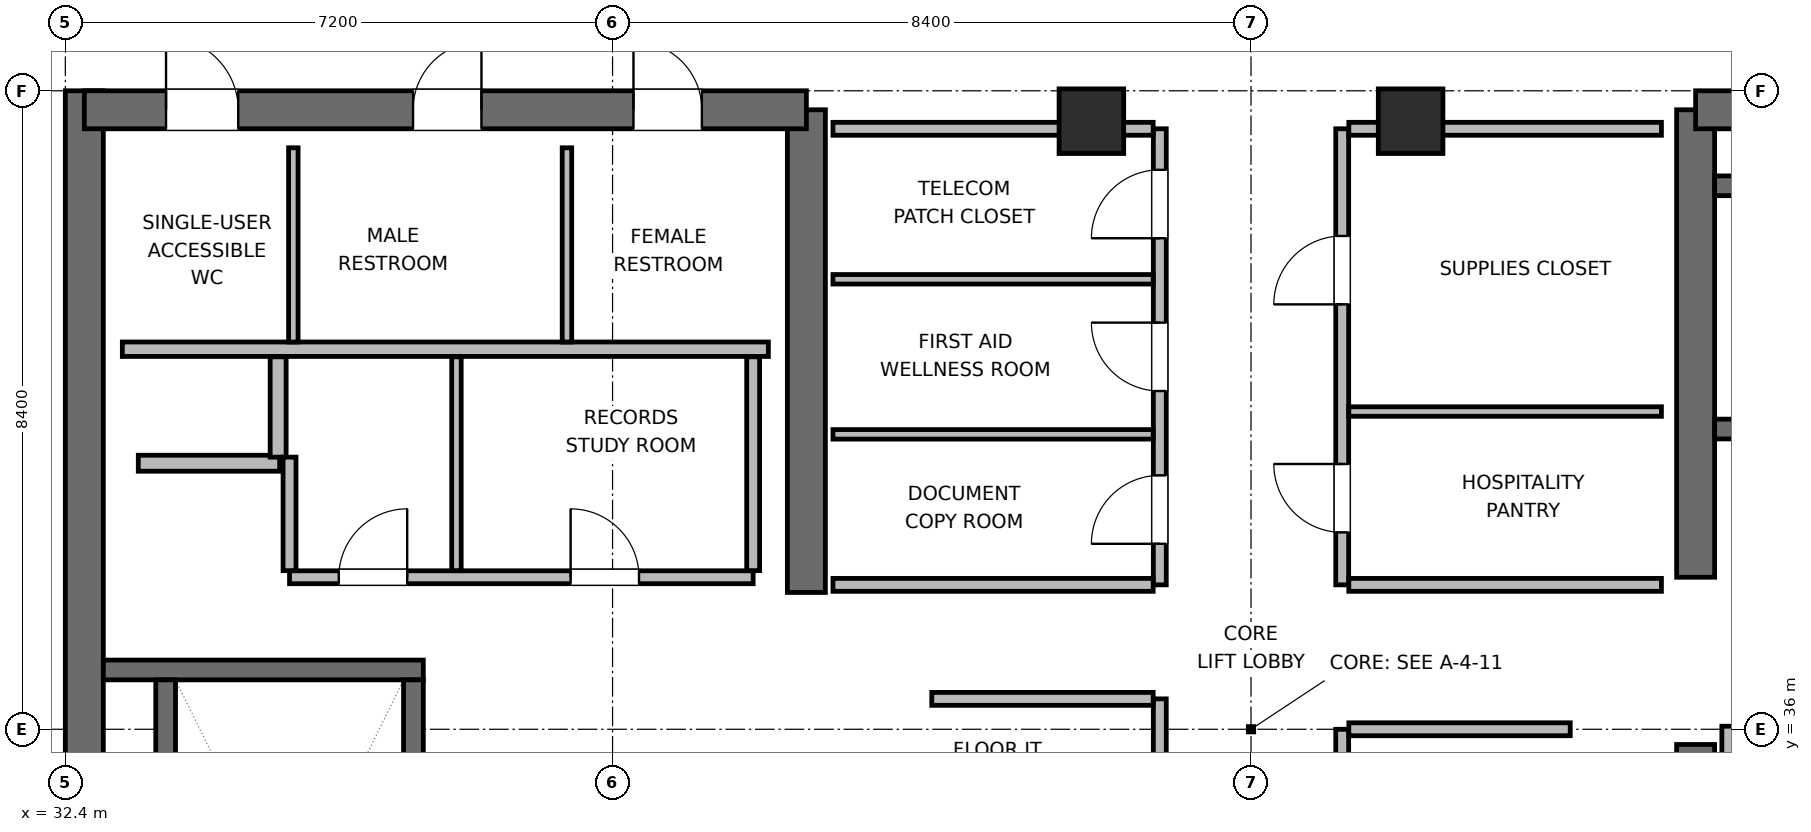
"""IFC4 building model, lengths in metres.
Left out: names, types, materials, properties, quantities, classifications, styles, units other than length and angle.
Written with IfcOpenShell. Run it as: python <this file> out.ifc"""

import sys

from ifc_helpers import new_model, si_unit, direction, frame, frame_2d, origin, origin_2d, place, context, subcontext, project, spatial, rectangle, extrude, element, fill, save


model = new_model("IFC4")
c1 = context("Model", 3, precision=1e-05, world=origin(), true_north=direction((0.0, 1.0)))
c2 = subcontext(c1, "Body", "Model", "MODEL_VIEW")
j1 = project(units=[si_unit("LENGTHUNIT", "METRE"), si_unit("PLANEANGLEUNIT", "RADIAN")], contexts=[c1])
p1 = place(None, origin())
s1 = spatial("IfcSite", under=j1, at=p1, CompositionType="ELEMENT")
p2 = place(p1, origin())
s2 = spatial("IfcBuilding", under=s1, at=p2, CompositionType="ELEMENT")
p3 = place(p2, frame((0.0, 0.0, 274.5)))
s3 = spatial("IfcBuildingStorey", under=s2, at=p3, CompositionType="ELEMENT", Elevation=274.5)
p4 = place(p3, frame((32.65, 27.6, 0.0), z_axis=(0.0, 0.0, 1.0), x_axis=(0.0, 1.0, 0.0)))
e1 = element("IfcWall", 1, at=p4, inside=s3, PredefinedType="SHEAR", context=c2, shape_type="SweptSolid", body=[
    extrude(rectangle(XDim=16.8, YDim=0.5, at=frame_2d((8.4, 0.0))), origin(), (0.0, 0.0, 1.0), 3.9),
])
p5 = place(p3, frame((42.15, 37.8, 0.0), z_axis=(0.0, 0.0, 1.0), x_axis=(0.0, 1.0, 0.0)))
e2 = element("IfcWall", 2, at=p5, inside=s3, PredefinedType="SHEAR", context=c2, shape_type="SweptSolid", body=[
    extrude(rectangle(XDim=6.35, YDim=0.5, at=frame_2d((3.175, 0.0))), origin(), (0.0, 0.0, 1.0), 3.9),
])
p6 = place(p3, frame((32.65, 44.15, 0.0), z_axis=(0.0, 0.0, 1.0), x_axis=(1.0, 0.0, 0.0)))
e3 = element("IfcWall", 3, at=p6, inside=s3, PredefinedType="SHEAR", context=c2, shape_type="SweptSolid", body=[
    extrude(rectangle(XDim=9.5, YDim=0.5, at=frame_2d((4.75, 0.0))), origin(), (0.0, 0.0, 1.0), 3.9),
])
p7 = place(p6, frame((1.075, 0.0, 0.0)))
e4 = element("IfcOpeningElement", 4, at=p7, cuts=e3, PredefinedType="OPENING", context=c2, shape_type="SweptSolid", body=[
    extrude(rectangle(XDim=0.95, YDim=2.04, at=frame_2d((0.475, 1.02))), frame((0.0, 0.26, 0.0), z_axis=(0.0, -1.0, 0.0), x_axis=(1.0, 0.0, 0.0)), (0.0, 0.0, 1.0), 0.52),
])
p8 = place(p6, frame((4.325, 0.0, 0.0)))
e5 = element("IfcOpeningElement", 5, at=p8, cuts=e3, PredefinedType="OPENING", context=c2, shape_type="SweptSolid", body=[
    extrude(rectangle(XDim=0.9, YDim=2.02, at=frame_2d((0.45, 1.01))), frame((0.0, 0.26, 0.0), z_axis=(0.0, -1.0, 0.0), x_axis=(1.0, 0.0, 0.0)), (0.0, 0.0, 1.0), 0.52),
])
p9 = place(p6, frame((7.225, 0.0, 0.0)))
e6 = element("IfcOpeningElement", 6, at=p9, cuts=e3, PredefinedType="OPENING", context=c2, shape_type="SweptSolid", body=[
    extrude(rectangle(XDim=0.9, YDim=2.02, at=frame_2d((0.45, 1.01))), frame((0.0, 0.26, 0.0), z_axis=(0.0, -1.0, 0.0), x_axis=(1.0, 0.0, 0.0)), (0.0, 0.0, 1.0), 0.52),
])
p10 = place(p3, frame((53.85, 27.85, 0.0), z_axis=(0.0, 0.0, 1.0), x_axis=(0.0, 1.0, 0.0)))
e7 = element("IfcWall", 7, at=p10, inside=s3, PredefinedType="SHEAR", context=c2, shape_type="SweptSolid", body=[
    extrude(rectangle(XDim=7.95, YDim=0.5, at=frame_2d((3.975, 0.0))), origin(), (0.0, 0.0, 1.0), 3.9),
])
p11 = place(p3, frame((53.85, 38.0, 0.0), z_axis=(0.0, 0.0, 1.0), x_axis=(0.0, 1.0, 0.0)))
e8 = element("IfcWall", 8, at=p11, inside=s3, PredefinedType="SHEAR", context=c2, shape_type="SweptSolid", body=[
    extrude(rectangle(XDim=6.15, YDim=0.5, at=frame_2d((3.075, 0.0))), origin(), (0.0, 0.0, 1.0), 3.9),
])
p12 = place(p3, frame((53.85, 44.15, 0.0), z_axis=(0.0, 0.0, 1.0), x_axis=(1.0, 0.0, 0.0)))
e9 = element("IfcWall", 9, at=p12, inside=s3, PredefinedType="SHEAR", context=c2, shape_type="SweptSolid", body=[
    extrude(rectangle(XDim=9.5, YDim=0.5, at=frame_2d((4.75, 0.0))), origin(), (0.0, 0.0, 1.0), 3.9),
])
p13 = place(p3, frame((32.9, 36.78, 0.0), z_axis=(0.0, 0.0, 1.0), x_axis=(1.0, 0.0, 0.0)))
e10 = element("IfcWall", 10, at=p13, inside=s3, PredefinedType="SHEAR", context=c2, shape_type="SweptSolid", body=[
    extrude(rectangle(XDim=4.21, YDim=0.26, at=frame_2d((2.105, 0.0))), origin(), (0.0, 0.0, 1.0), 3.9),
])
p14 = place(p3, frame((33.72, 29.05, 0.0), z_axis=(0.0, 0.0, 1.0), x_axis=(0.0, 1.0, 0.0)))
e11 = element("IfcWall", 11, at=p14, inside=s3, PredefinedType="SHEAR", context=c2, shape_type="SweptSolid", body=[
    extrude(rectangle(XDim=7.6, YDim=0.26, at=frame_2d((3.8, 0.0))), origin(), (0.0, 0.0, 1.0), 3.9),
])
p15 = place(p3, frame((36.98, 29.05, 0.0), z_axis=(0.0, 0.0, 1.0), x_axis=(0.0, 1.0, 0.0)))
e12 = element("IfcWall", 12, at=p15, inside=s3, PredefinedType="SHEAR", context=c2, shape_type="SweptSolid", body=[
    extrude(rectangle(XDim=7.6, YDim=0.26, at=frame_2d((3.8, 0.0))), origin(), (0.0, 0.0, 1.0), 3.9),
])
p16 = place(p15, frame((0.3, 0.0, 0.0)))
e13 = element("IfcOpeningElement", 13, at=p16, cuts=e12, PredefinedType="OPENING", context=c2, shape_type="SweptSolid", body=[
    extrude(rectangle(XDim=1.0, YDim=2.04, at=frame_2d((0.5, 1.02))), frame((0.0, 0.14, 0.0), z_axis=(0.0, -1.0, 0.0), x_axis=(1.0, 0.0, 0.0)), (0.0, 0.0, 1.0), 0.28),
])
p17 = place(p3, frame((54.1, 39.95, 0.0), z_axis=(0.0, 0.0, 1.0), x_axis=(1.0, 0.0, 0.0)))
e14 = element("IfcWall", 14, at=p17, inside=s3, PredefinedType="SHEAR", context=c2, shape_type="SweptSolid", body=[
    extrude(rectangle(XDim=9.0, YDim=0.26, at=frame_2d((4.5, 0.0))), origin(), (0.0, 0.0, 1.0), 3.9),
])
p18 = place(p17, frame((1.1, 0.0, 0.0)))
e15 = element("IfcOpeningElement", 15, at=p18, cuts=e14, PredefinedType="OPENING", context=c2, shape_type="SweptSolid", body=[
    extrude(rectangle(XDim=1.0, YDim=2.04, at=frame_2d((0.5, 1.02))), frame((0.0, 0.14, 0.0), z_axis=(0.0, -1.0, 0.0), x_axis=(1.0, 0.0, 0.0)), (0.0, 0.0, 1.0), 0.28),
])
p19 = place(p3, frame((54.1, 43.15, 0.0), z_axis=(0.0, 0.0, 1.0), x_axis=(1.0, 0.0, 0.0)))
e16 = element("IfcWall", 16, at=p19, inside=s3, PredefinedType="SHEAR", context=c2, shape_type="SweptSolid", body=[
    extrude(rectangle(XDim=9.0, YDim=0.26, at=frame_2d((4.5, 0.0))), origin(), (0.0, 0.0, 1.0), 3.9),
])
for number, where, z_axis, x_axis in (
    (17, (45.9, 44.0, 0.0), (0.0, 0.0, 1.0), (1.0, 0.0, 0.0)),
    (18, (50.1, 44.0, 0.0), (0.0, 0.0, 1.0), (1.0, 0.0, 0.0)),
):
    element("IfcColumn", number, at=place(p3, frame(where, z_axis=z_axis, x_axis=x_axis)), inside=s3, PredefinedType="COLUMN", context=c2, shape_type="SweptSolid", body=[
        extrude(rectangle(XDim=0.85, YDim=0.85, at=origin_2d()), origin(), (0.0, 0.0, 1.0), 3.9),
    ])
p20 = place(p3, frame((33.15, 41.0, 0.0), z_axis=(0.0, 0.0, 1.0), x_axis=(1.0, 0.0, 0.0)))
e19 = element("IfcWall", 19, at=p20, inside=s3, PredefinedType="PLUMBINGWALL", context=c2, shape_type="SweptSolid", body=[
    extrude(rectangle(XDim=8.5, YDim=0.19, at=frame_2d((4.25, 0.0))), origin(), (0.0, 0.0, 1.0), 3.68),
])
for number, where, z_axis, x_axis in (
    (20, (35.4, 41.095, 0.0), (0.0, 0.0, 1.0), (0.0, 1.0, 0.0)),
    (21, (39.0, 41.095, 0.0), (0.0, 0.0, 1.0), (0.0, 1.0, 0.0)),
):
    element("IfcWall", number, at=place(p3, frame(where, z_axis=z_axis, x_axis=x_axis)), inside=s3, PredefinedType="PARTITIONING", context=c2, shape_type="SweptSolid", body=[
        extrude(rectangle(XDim=2.555, YDim=0.125, at=frame_2d((1.277, 0.0))), origin(), (0.0, 0.0, 1.0), 3.68),
    ])
p21 = place(p3, frame((33.36, 39.5, 0.0), z_axis=(0.0, 0.0, 1.0), x_axis=(1.0, 0.0, 0.0)))
e22 = element("IfcWall", 22, at=p21, inside=s3, PredefinedType="PARTITIONING", context=c2, shape_type="SweptSolid", body=[
    extrude(rectangle(XDim=1.86, YDim=0.21, at=frame_2d((0.93, 0.0))), origin(), (0.0, 0.0, 1.0), 3.68),
])
p22 = place(p3, frame((35.2, 39.58, 0.0), z_axis=(0.0, 0.0, 1.0), x_axis=(0.0, 1.0, 0.0)))
e23 = element("IfcWall", 23, at=p22, inside=s3, PredefinedType="PARTITIONING", context=c2, shape_type="SweptSolid", body=[
    extrude(rectangle(XDim=1.32, YDim=0.21, at=frame_2d((0.66, 0.0))), origin(), (0.0, 0.0, 1.0), 3.68),
])
p23 = place(p3, frame((54.3, 34.26, 0.0), z_axis=(0.0, 0.0, 1.0), x_axis=(0.0, 1.0, 0.0)))
e24 = element("IfcWall", 24, at=p23, inside=s3, PredefinedType="PARTITIONING", context=c2, shape_type="SweptSolid", body=[
    extrude(rectangle(XDim=1.78, YDim=0.21, at=frame_2d((0.89, 0.0))), origin(), (0.0, 0.0, 1.0), 3.68),
])
p24 = place(p3, frame((35.35, 38.0, 0.0), z_axis=(0.0, 0.0, 1.0), x_axis=(1.0, 0.0, 0.0)))
e25 = element("IfcWall", 25, at=p24, inside=s3, PredefinedType="PARTITIONING", context=c2, shape_type="SweptSolid", body=[
    extrude(rectangle(XDim=6.1, YDim=0.17, at=frame_2d((3.05, 0.0))), origin(), (0.0, 0.0, 1.0), 3.68),
])
p25 = place(p24, frame((0.648, 0.0, 0.0)))
e26 = element("IfcOpeningElement", 26, at=p25, cuts=e25, PredefinedType="OPENING", context=c2, shape_type="SweptSolid", body=[
    extrude(rectangle(XDim=0.9, YDim=2.02, at=frame_2d((0.45, 1.01))), frame((0.0, 0.095, 0.0), z_axis=(0.0, -1.0, 0.0), x_axis=(1.0, 0.0, 0.0)), (0.0, 0.0, 1.0), 0.19),
])
p26 = place(p24, frame((3.698, 0.0, 0.0)))
e27 = element("IfcOpeningElement", 27, at=p26, cuts=e25, PredefinedType="OPENING", context=c2, shape_type="SweptSolid", body=[
    extrude(rectangle(XDim=0.9, YDim=2.02, at=frame_2d((0.45, 1.01))), frame((0.0, 0.095, 0.0), z_axis=(0.0, -1.0, 0.0), x_axis=(1.0, 0.0, 0.0)), (0.0, 0.0, 1.0), 0.19),
])
p27 = place(p3, frame((35.35, 38.087, 0.0), z_axis=(0.0, 0.0, 1.0), x_axis=(0.0, 1.0, 0.0)))
e28 = element("IfcWall", 28, at=p27, inside=s3, PredefinedType="PARTITIONING", context=c2, shape_type="SweptSolid", body=[
    extrude(rectangle(XDim=1.493, YDim=0.17, at=frame_2d((0.747, 0.0))), origin(), (0.0, 0.0, 1.0), 3.68),
])
p28 = place(p3, frame((41.45, 38.087, 0.0), z_axis=(0.0, 0.0, 1.0), x_axis=(0.0, 1.0, 0.0)))
e29 = element("IfcWall", 29, at=p28, inside=s3, PredefinedType="PARTITIONING", context=c2, shape_type="SweptSolid", body=[
    extrude(rectangle(XDim=2.813, YDim=0.17, at=frame_2d((1.406, 0.0))), origin(), (0.0, 0.0, 1.0), 3.68),
])
p29 = place(p3, frame((37.546, 38.087, 0.0), z_axis=(0.0, 0.0, 1.0), x_axis=(0.0, 1.0, 0.0)))
e30 = element("IfcWall", 30, at=p29, inside=s3, PredefinedType="PARTITIONING", context=c2, shape_type="SweptSolid", body=[
    extrude(rectangle(XDim=2.813, YDim=0.125, at=frame_2d((1.406, 0.0))), origin(), (0.0, 0.0, 1.0), 3.68),
])
p30 = place(p3, frame((46.8, 32.6, 0.0), z_axis=(0.0, 0.0, 1.0), x_axis=(0.0, 1.0, 0.0)))
e31 = element("IfcWall", 31, at=p30, inside=s3, PredefinedType="PARTITIONING", context=c2, shape_type="SweptSolid", body=[
    extrude(rectangle(XDim=3.8, YDim=0.17, at=frame_2d((1.9, 0.0))), origin(), (0.0, 0.0, 1.0), 3.68),
])
p31 = place(p30, frame((0.272, 0.0, 0.0)))
e32 = element("IfcOpeningElement", 32, at=p31, cuts=e31, PredefinedType="OPENING", context=c2, shape_type="SweptSolid", body=[
    extrude(rectangle(XDim=0.9, YDim=2.02, at=frame_2d((0.45, 1.01))), frame((0.0, 0.095, 0.0), z_axis=(0.0, -1.0, 0.0), x_axis=(1.0, 0.0, 0.0)), (0.0, 0.0, 1.0), 0.19),
])
p32 = place(p30, frame((2.172, 0.0, 0.0)))
e33 = element("IfcOpeningElement", 33, at=p32, cuts=e31, PredefinedType="OPENING", context=c2, shape_type="SweptSolid", body=[
    extrude(rectangle(XDim=0.9, YDim=2.02, at=frame_2d((0.45, 1.01))), frame((0.0, 0.095, 0.0), z_axis=(0.0, -1.0, 0.0), x_axis=(1.0, 0.0, 0.0)), (0.0, 0.0, 1.0), 0.19),
])
p33 = place(p3, frame((43.8, 36.4, 0.0), z_axis=(0.0, 0.0, 1.0), x_axis=(1.0, 0.0, 0.0)))
e34 = element("IfcWall", 34, at=p33, inside=s3, PredefinedType="PARTITIONING", context=c2, shape_type="SweptSolid", body=[
    extrude(rectangle(XDim=2.913, YDim=0.17, at=frame_2d((1.457, 0.0))), origin(), (0.0, 0.0, 1.0), 3.68),
])
p34 = place(p3, frame((49.2, 32.6, 0.0), z_axis=(0.0, 0.0, 1.0), x_axis=(0.0, 1.0, 0.0)))
e35 = element("IfcWall", 35, at=p34, inside=s3, PredefinedType="PARTITIONING", context=c2, shape_type="SweptSolid", body=[
    extrude(rectangle(XDim=3.4, YDim=0.17, at=frame_2d((1.7, 0.0))), origin(), (0.0, 0.0, 1.0), 3.68),
])
p35 = place(p34, frame((0.638, 0.0, 0.0)))
e36 = element("IfcOpeningElement", 36, at=p35, cuts=e35, PredefinedType="OPENING", context=c2, shape_type="SweptSolid", body=[
    extrude(rectangle(XDim=0.9, YDim=2.02, at=frame_2d((0.45, 1.01))), frame((0.0, 0.095, 0.0), z_axis=(0.0, -1.0, 0.0), x_axis=(1.0, 0.0, 0.0)), (0.0, 0.0, 1.0), 0.19),
])
p36 = place(p3, frame((49.287, 36.0, 0.0), z_axis=(0.0, 0.0, 1.0), x_axis=(1.0, 0.0, 0.0)))
e37 = element("IfcWall", 37, at=p36, inside=s3, PredefinedType="PARTITIONING", context=c2, shape_type="SweptSolid", body=[
    extrude(rectangle(XDim=2.913, YDim=0.17, at=frame_2d((1.457, 0.0))), origin(), (0.0, 0.0, 1.0), 3.68),
])
p37 = place(p3, frame((46.8, 37.9, 0.0), z_axis=(0.0, 0.0, 1.0), x_axis=(0.0, 1.0, 0.0)))
e38 = element("IfcWall", 38, at=p37, inside=s3, PredefinedType="PARTITIONING", context=c2, shape_type="SweptSolid", body=[
    extrude(rectangle(XDim=6.0, YDim=0.17, at=frame_2d((3.0, 0.0))), origin(), (0.0, 0.0, 1.0), 3.68),
])
p38 = place(p37, frame((0.54, 0.0, 0.0)))
e39 = element("IfcOpeningElement", 39, at=p38, cuts=e38, PredefinedType="OPENING", context=c2, shape_type="SweptSolid", body=[
    extrude(rectangle(XDim=0.9, YDim=2.02, at=frame_2d((0.45, 1.01))), frame((0.0, 0.095, 0.0), z_axis=(0.0, -1.0, 0.0), x_axis=(1.0, 0.0, 0.0)), (0.0, 0.0, 1.0), 0.19),
])
p39 = place(p37, frame((2.55, 0.0, 0.0)))
e40 = element("IfcOpeningElement", 40, at=p39, cuts=e38, PredefinedType="OPENING", context=c2, shape_type="SweptSolid", body=[
    extrude(rectangle(XDim=0.9, YDim=2.02, at=frame_2d((0.45, 1.01))), frame((0.0, 0.095, 0.0), z_axis=(0.0, -1.0, 0.0), x_axis=(1.0, 0.0, 0.0)), (0.0, 0.0, 1.0), 0.19),
])
p40 = place(p37, frame((4.56, 0.0, 0.0)))
e41 = element("IfcOpeningElement", 41, at=p40, cuts=e38, PredefinedType="OPENING", context=c2, shape_type="SweptSolid", body=[
    extrude(rectangle(XDim=0.9, YDim=2.02, at=frame_2d((0.45, 1.01))), frame((0.0, 0.095, 0.0), z_axis=(0.0, -1.0, 0.0), x_axis=(1.0, 0.0, 0.0)), (0.0, 0.0, 1.0), 0.19),
])
p41 = place(p3, frame((42.5, 37.9, 0.0), z_axis=(0.0, 0.0, 1.0), x_axis=(1.0, 0.0, 0.0)))
e42 = element("IfcWall", 42, at=p41, inside=s3, PredefinedType="PARTITIONING", context=c2, shape_type="SweptSolid", body=[
    extrude(rectangle(XDim=4.213, YDim=0.17, at=frame_2d((2.106, 0.0))), origin(), (0.0, 0.0, 1.0), 3.68),
])
p42 = place(p3, frame((42.5, 43.9, 0.0), z_axis=(0.0, 0.0, 1.0), x_axis=(1.0, 0.0, 0.0)))
e43 = element("IfcWall", 43, at=p42, inside=s3, PredefinedType="PARTITIONING", context=c2, shape_type="SweptSolid", body=[
    extrude(rectangle(XDim=4.213, YDim=0.17, at=frame_2d((2.106, 0.0))), origin(), (0.0, 0.0, 1.0), 2.765),
])
for number, where, z_axis, x_axis in (
    (44, (42.5, 39.88, 0.0), (0.0, 0.0, 1.0), (1.0, 0.0, 0.0)),
    (45, (42.5, 41.92, 0.0), (0.0, 0.0, 1.0), (1.0, 0.0, 0.0)),
):
    element("IfcWall", number, at=place(p3, frame(where, z_axis=z_axis, x_axis=x_axis)), inside=s3, PredefinedType="PARTITIONING", context=c2, shape_type="SweptSolid", body=[
        extrude(rectangle(XDim=4.213, YDim=0.125, at=frame_2d((2.106, 0.0))), origin(), (0.0, 0.0, 1.0), 3.68),
    ])
p43 = place(p3, frame((49.2, 37.9, 0.0), z_axis=(0.0, 0.0, 1.0), x_axis=(0.0, 1.0, 0.0)))
e46 = element("IfcWall", 46, at=p43, inside=s3, PredefinedType="PARTITIONING", context=c2, shape_type="SweptSolid", body=[
    extrude(rectangle(XDim=6.0, YDim=0.17, at=frame_2d((3.0, 0.0))), origin(), (0.0, 0.0, 1.0), 3.68),
])
p44 = place(p43, frame((0.69, 0.0, 0.0)))
e47 = element("IfcOpeningElement", 47, at=p44, cuts=e46, PredefinedType="OPENING", context=c2, shape_type="SweptSolid", body=[
    extrude(rectangle(XDim=0.9, YDim=2.02, at=frame_2d((0.45, 1.01))), frame((0.0, 0.095, 0.0), z_axis=(0.0, -1.0, 0.0), x_axis=(1.0, 0.0, 0.0)), (0.0, 0.0, 1.0), 0.19),
])
p45 = place(p43, frame((3.69, 0.0, 0.0)))
e48 = element("IfcOpeningElement", 48, at=p45, cuts=e46, PredefinedType="OPENING", context=c2, shape_type="SweptSolid", body=[
    extrude(rectangle(XDim=0.9, YDim=2.02, at=frame_2d((0.45, 1.01))), frame((0.0, 0.095, 0.0), z_axis=(0.0, -1.0, 0.0), x_axis=(1.0, 0.0, 0.0)), (0.0, 0.0, 1.0), 0.19),
])
p46 = place(p3, frame((49.287, 37.9, 0.0), z_axis=(0.0, 0.0, 1.0), x_axis=(1.0, 0.0, 0.0)))
e49 = element("IfcWall", 49, at=p46, inside=s3, PredefinedType="PARTITIONING", context=c2, shape_type="SweptSolid", body=[
    extrude(rectangle(XDim=4.113, YDim=0.17, at=frame_2d((2.056, 0.0))), origin(), (0.0, 0.0, 1.0), 3.68),
])
p47 = place(p3, frame((49.287, 43.9, 0.0), z_axis=(0.0, 0.0, 1.0), x_axis=(1.0, 0.0, 0.0)))
e50 = element("IfcWall", 50, at=p47, inside=s3, PredefinedType="PARTITIONING", context=c2, shape_type="SweptSolid", body=[
    extrude(rectangle(XDim=4.113, YDim=0.17, at=frame_2d((2.056, 0.0))), origin(), (0.0, 0.0, 1.0), 2.765),
])
p48 = place(p3, frame((49.287, 40.18, 0.0), z_axis=(0.0, 0.0, 1.0), x_axis=(1.0, 0.0, 0.0)))
e51 = element("IfcWall", 51, at=p48, inside=s3, PredefinedType="PARTITIONING", context=c2, shape_type="SweptSolid", body=[
    extrude(rectangle(XDim=4.113, YDim=0.125, at=frame_2d((2.056, 0.0))), origin(), (0.0, 0.0, 1.0), 3.68),
])
p49 = place(p7, origin())
e52 = element("IfcDoor", 52, at=p49, inside=s3, OperationType="SINGLE_SWING_LEFT", PredefinedType="DOOR", context=c2, shape_type="SweptSolid", body=[
    extrude(rectangle(XDim=0.95, YDim=2.04, at=frame_2d((0.475, 1.02))), frame((0.0, 0.025, 0.0), z_axis=(0.0, -1.0, 0.0), x_axis=(1.0, 0.0, 0.0)), (0.0, 0.0, 1.0), 0.05),
])
fill(e4, e52)
p50 = place(p8, origin())
e53 = element("IfcDoor", 53, at=p50, inside=s3, OperationType="SINGLE_SWING_RIGHT", PredefinedType="DOOR", context=c2, shape_type="SweptSolid", body=[
    extrude(rectangle(XDim=0.9, YDim=2.02, at=frame_2d((0.45, 1.01))), frame((0.0, 0.025, 0.0), z_axis=(0.0, -1.0, 0.0), x_axis=(1.0, 0.0, 0.0)), (0.0, 0.0, 1.0), 0.05),
])
fill(e5, e53)
p51 = place(p9, origin())
e54 = element("IfcDoor", 54, at=p51, inside=s3, OperationType="SINGLE_SWING_LEFT", PredefinedType="DOOR", context=c2, shape_type="SweptSolid", body=[
    extrude(rectangle(XDim=0.9, YDim=2.02, at=frame_2d((0.45, 1.01))), frame((0.0, 0.025, 0.0), z_axis=(0.0, -1.0, 0.0), x_axis=(1.0, 0.0, 0.0)), (0.0, 0.0, 1.0), 0.05),
])
fill(e6, e54)
p52 = place(p25, origin())
e55 = element("IfcDoor", 55, at=p52, inside=s3, OperationType="SINGLE_SWING_RIGHT", PredefinedType="DOOR", context=c2, shape_type="SweptSolid", body=[
    extrude(rectangle(XDim=0.9, YDim=2.02, at=frame_2d((0.45, 1.01))), frame((0.0, 0.025, 0.0), z_axis=(0.0, -1.0, 0.0), x_axis=(1.0, 0.0, 0.0)), (0.0, 0.0, 1.0), 0.05),
])
fill(e26, e55)
p53 = place(p26, origin())
e56 = element("IfcDoor", 56, at=p53, inside=s3, OperationType="SINGLE_SWING_LEFT", PredefinedType="DOOR", context=c2, shape_type="SweptSolid", body=[
    extrude(rectangle(XDim=0.9, YDim=2.02, at=frame_2d((0.45, 1.01))), frame((0.0, 0.025, 0.0), z_axis=(0.0, -1.0, 0.0), x_axis=(1.0, 0.0, 0.0)), (0.0, 0.0, 1.0), 0.05),
])
fill(e27, e56)
p54 = place(p38, origin())
e57 = element("IfcDoor", 57, at=p54, inside=s3, OperationType="SINGLE_SWING_LEFT", PredefinedType="DOOR", context=c2, shape_type="SweptSolid", body=[
    extrude(rectangle(XDim=0.9, YDim=2.02, at=frame_2d((0.45, 1.01))), frame((0.0, 0.025, 0.0), z_axis=(0.0, -1.0, 0.0), x_axis=(1.0, 0.0, 0.0)), (0.0, 0.0, 1.0), 0.05),
])
fill(e39, e57)
p55 = place(p39, origin())
e58 = element("IfcDoor", 58, at=p55, inside=s3, OperationType="SINGLE_SWING_RIGHT", PredefinedType="DOOR", context=c2, shape_type="SweptSolid", body=[
    extrude(rectangle(XDim=0.9, YDim=2.02, at=frame_2d((0.45, 1.01))), frame((0.0, 0.025, 0.0), z_axis=(0.0, -1.0, 0.0), x_axis=(1.0, 0.0, 0.0)), (0.0, 0.0, 1.0), 0.05),
])
fill(e40, e58)
p56 = place(p40, origin())
e59 = element("IfcDoor", 59, at=p56, inside=s3, OperationType="SINGLE_SWING_LEFT", PredefinedType="DOOR", context=c2, shape_type="SweptSolid", body=[
    extrude(rectangle(XDim=0.9, YDim=2.02, at=frame_2d((0.45, 1.01))), frame((0.0, 0.025, 0.0), z_axis=(0.0, -1.0, 0.0), x_axis=(1.0, 0.0, 0.0)), (0.0, 0.0, 1.0), 0.05),
])
fill(e41, e59)
p57 = place(p44, origin())
e60 = element("IfcDoor", 60, at=p57, inside=s3, OperationType="SINGLE_SWING_RIGHT", PredefinedType="DOOR", context=c2, shape_type="SweptSolid", body=[
    extrude(rectangle(XDim=0.9, YDim=2.02, at=frame_2d((0.45, 1.01))), frame((0.0, 0.025, 0.0), z_axis=(0.0, -1.0, 0.0), x_axis=(1.0, 0.0, 0.0)), (0.0, 0.0, 1.0), 0.05),
])
fill(e47, e60)
p58 = place(p45, origin())
e61 = element("IfcDoor", 61, at=p58, inside=s3, OperationType="SINGLE_SWING_LEFT", PredefinedType="DOOR", context=c2, shape_type="SweptSolid", body=[
    extrude(rectangle(XDim=0.9, YDim=2.02, at=frame_2d((0.45, 1.01))), frame((0.0, 0.025, 0.0), z_axis=(0.0, -1.0, 0.0), x_axis=(1.0, 0.0, 0.0)), (0.0, 0.0, 1.0), 0.05),
])
fill(e48, e61)
save(model, sys.argv[1])
